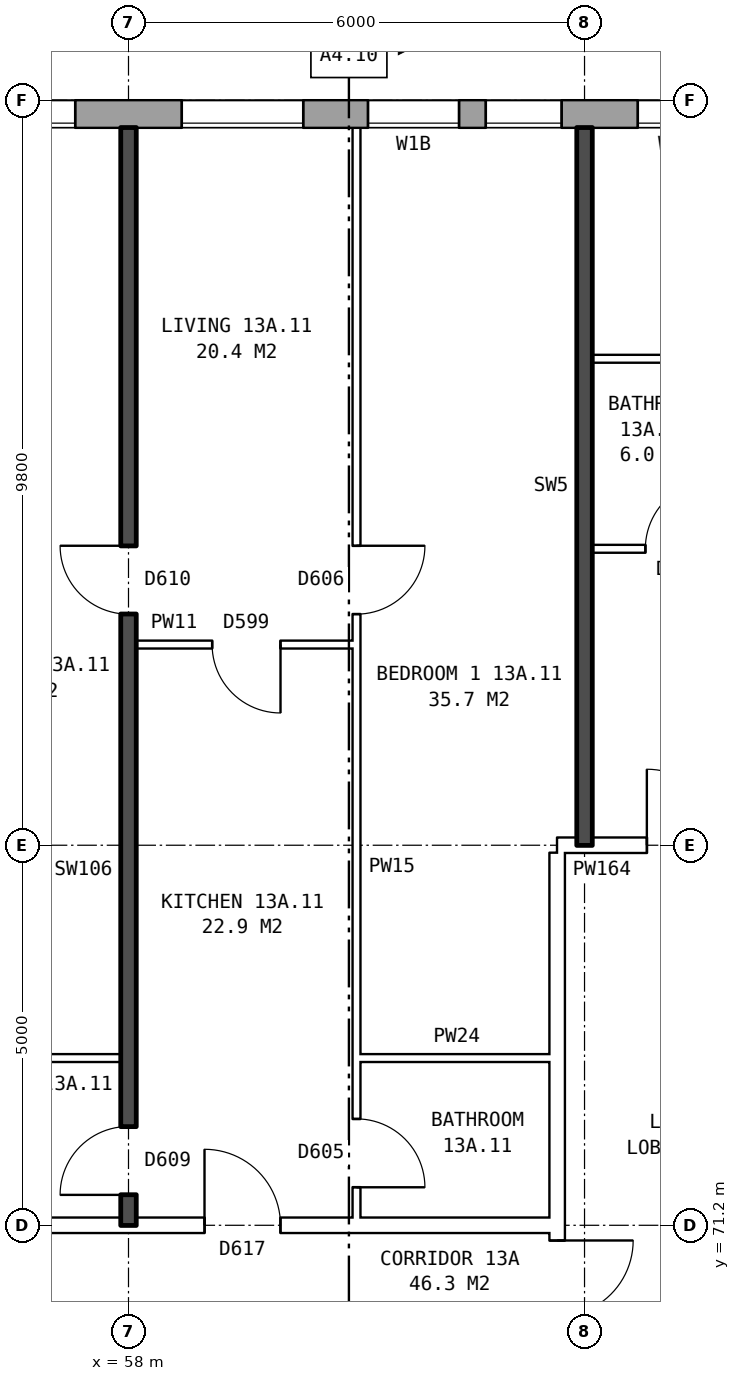
"""IFC4 building model, lengths in metres.
Left out: names, types, materials, properties, quantities, classifications, styles, units other than length and angle.
Written with IfcOpenShell. Run it as: python <this file> out.ifc"""

import sys

from ifc_helpers import new_model, si_unit, direction, frame, frame_2d, origin, place, context, subcontext, project, spatial, rectangle, extrude, element, fill, save


model = new_model("IFC4")
c1 = context("Model", 3, precision=1e-05, world=origin(), true_north=direction((0.0, 1.0)))
c2 = subcontext(c1, "Body", "Model", "MODEL_VIEW")
j1 = project(units=[si_unit("LENGTHUNIT", "METRE"), si_unit("PLANEANGLEUNIT", "RADIAN")], contexts=[c1])
p1 = place(None, origin())
s1 = spatial("IfcSite", under=j1, at=p1, CompositionType="ELEMENT")
p2 = place(p1, origin())
s2 = spatial("IfcBuilding", under=s1, at=p2, CompositionType="ELEMENT")
p3 = place(p2, frame((0.0, 0.0, 50.5)))
s3 = spatial("IfcBuildingStorey", under=s2, at=p3, CompositionType="ELEMENT", Elevation=50.5)
p4 = place(p3, frame((72.925, 85.82, 0.0), z_axis=(0.0, 0.0, 1.0), x_axis=(-1.0, 0.0, 0.0)))
e1 = element("IfcWall", 1, at=p4, inside=s3, PredefinedType="STANDARD", context=c2, shape_type="SweptSolid", body=[
    extrude(rectangle(XDim=48.351, YDim=0.36, at=frame_2d((24.175, 0.0))), origin(), (0.0, 0.0, 1.0), 2.85),
])
p5 = place(p4, frame((0.625, 0.0, 0.8)))
e2 = element("IfcOpeningElement", 2, at=p5, cuts=e1, PredefinedType="OPENING", context=c2, shape_type="SweptSolid", body=[
    extrude(rectangle(XDim=1.6, YDim=1.8, at=frame_2d((0.8, 0.9))), frame((0.0, 0.19, 0.0), z_axis=(0.0, -1.0, 0.0), x_axis=(1.0, 0.0, 0.0)), (0.0, 0.0, 1.0), 0.38),
])
p6 = place(p4, frame((3.625, 0.0, 0.8)))
e3 = element("IfcOpeningElement", 3, at=p6, cuts=e1, PredefinedType="OPENING", context=c2, shape_type="SweptSolid", body=[
    extrude(rectangle(XDim=1.6, YDim=1.8, at=frame_2d((0.8, 0.9))), frame((0.0, 0.19, 0.0), z_axis=(0.0, -1.0, 0.0), x_axis=(1.0, 0.0, 0.0)), (0.0, 0.0, 1.0), 0.38),
])
p7 = place(p4, frame((5.525, 0.0, 0.8)))
e4 = element("IfcOpeningElement", 4, at=p7, cuts=e1, PredefinedType="OPENING", context=c2, shape_type="SweptSolid", body=[
    extrude(rectangle(XDim=1.4, YDim=1.8, at=frame_2d((0.7, 0.9))), frame((0.0, 0.19, 0.0), z_axis=(0.0, -1.0, 0.0), x_axis=(1.0, 0.0, 0.0)), (0.0, 0.0, 1.0), 0.38),
])
p8 = place(p4, frame((9.225, 0.0, 0.45)))
e5 = element("IfcOpeningElement", 5, at=p8, cuts=e1, PredefinedType="OPENING", context=c2, shape_type="SweptSolid", body=[
    extrude(rectangle(XDim=1.0, YDim=0.9, at=frame_2d((0.5, 0.45))), frame((0.0, 0.19, 0.0), z_axis=(0.0, -1.0, 0.0), x_axis=(1.0, 0.0, 0.0)), (0.0, 0.0, 1.0), 0.38),
])
p9 = place(p4, frame((12.625, 0.0, 0.8)))
e6 = element("IfcOpeningElement", 6, at=p9, cuts=e1, PredefinedType="OPENING", context=c2, shape_type="SweptSolid", body=[
    extrude(rectangle(XDim=1.6, YDim=1.8, at=frame_2d((0.8, 0.9))), frame((0.0, 0.19, 0.0), z_axis=(0.0, -1.0, 0.0), x_axis=(1.0, 0.0, 0.0)), (0.0, 0.0, 1.0), 0.38),
])
p10 = place(p4, frame((15.625, 0.0, 0.8)))
e7 = element("IfcOpeningElement", 7, at=p10, cuts=e1, PredefinedType="OPENING", context=c2, shape_type="SweptSolid", body=[
    extrude(rectangle(XDim=1.6, YDim=1.8, at=frame_2d((0.8, 0.9))), frame((0.0, 0.19, 0.0), z_axis=(0.0, -1.0, 0.0), x_axis=(1.0, 0.0, 0.0)), (0.0, 0.0, 1.0), 0.38),
])
p11 = place(p4, frame((18.625, 0.0, 0.8)))
e8 = element("IfcOpeningElement", 8, at=p11, cuts=e1, PredefinedType="OPENING", context=c2, shape_type="SweptSolid", body=[
    extrude(rectangle(XDim=1.6, YDim=1.8, at=frame_2d((0.8, 0.9))), frame((0.0, 0.19, 0.0), z_axis=(0.0, -1.0, 0.0), x_axis=(1.0, 0.0, 0.0)), (0.0, 0.0, 1.0), 0.38),
])
p12 = place(p4, frame((21.625, 0.0, 0.8)))
e9 = element("IfcOpeningElement", 9, at=p12, cuts=e1, PredefinedType="OPENING", context=c2, shape_type="SweptSolid", body=[
    extrude(rectangle(XDim=1.6, YDim=1.8, at=frame_2d((0.8, 0.9))), frame((0.0, 0.19, 0.0), z_axis=(0.0, -1.0, 0.0), x_axis=(1.0, 0.0, 0.0)), (0.0, 0.0, 1.0), 0.38),
])
p13 = place(p4, frame((24.625, 0.0, 0.8)))
e10 = element("IfcOpeningElement", 10, at=p13, cuts=e1, PredefinedType="OPENING", context=c2, shape_type="SweptSolid", body=[
    extrude(rectangle(XDim=1.6, YDim=1.8, at=frame_2d((0.8, 0.9))), frame((0.0, 0.19, 0.0), z_axis=(0.0, -1.0, 0.0), x_axis=(1.0, 0.0, 0.0)), (0.0, 0.0, 1.0), 0.38),
])
p14 = place(p4, frame((27.625, 0.0, 0.8)))
e11 = element("IfcOpeningElement", 11, at=p14, cuts=e1, PredefinedType="OPENING", context=c2, shape_type="SweptSolid", body=[
    extrude(rectangle(XDim=1.6, YDim=1.8, at=frame_2d((0.8, 0.9))), frame((0.0, 0.19, 0.0), z_axis=(0.0, -1.0, 0.0), x_axis=(1.0, 0.0, 0.0)), (0.0, 0.0, 1.0), 0.38),
])
p15 = place(p4, frame((30.625, 0.0, 0.8)))
e12 = element("IfcOpeningElement", 12, at=p15, cuts=e1, PredefinedType="OPENING", context=c2, shape_type="SweptSolid", body=[
    extrude(rectangle(XDim=1.6, YDim=1.8, at=frame_2d((0.8, 0.9))), frame((0.0, 0.19, 0.0), z_axis=(0.0, -1.0, 0.0), x_axis=(1.0, 0.0, 0.0)), (0.0, 0.0, 1.0), 0.38),
])
p16 = place(p4, frame((33.625, 0.0, 0.8)))
e13 = element("IfcOpeningElement", 13, at=p16, cuts=e1, PredefinedType="OPENING", context=c2, shape_type="SweptSolid", body=[
    extrude(rectangle(XDim=1.6, YDim=1.8, at=frame_2d((0.8, 0.9))), frame((0.0, 0.19, 0.0), z_axis=(0.0, -1.0, 0.0), x_axis=(1.0, 0.0, 0.0)), (0.0, 0.0, 1.0), 0.38),
])
p17 = place(p4, frame((36.125, 0.0, 0.8)))
e14 = element("IfcOpeningElement", 14, at=p17, cuts=e1, PredefinedType="OPENING", context=c2, shape_type="SweptSolid", body=[
    extrude(rectangle(XDim=1.0, YDim=1.8, at=frame_2d((0.5, 0.9))), frame((0.0, 0.19, 0.0), z_axis=(0.0, -1.0, 0.0), x_axis=(1.0, 0.0, 0.0)), (0.0, 0.0, 1.0), 0.38),
])
p18 = place(p4, frame((39.975, 0.0, 1.7)))
e15 = element("IfcOpeningElement", 15, at=p18, cuts=e1, PredefinedType="OPENING", context=c2, shape_type="SweptSolid", body=[
    extrude(rectangle(XDim=1.0, YDim=0.9, at=frame_2d((0.5, 0.45))), frame((0.0, 0.19, 0.0), z_axis=(0.0, -1.0, 0.0), x_axis=(1.0, 0.0, 0.0)), (0.0, 0.0, 1.0), 0.38),
])
p19 = place(p4, frame((42.625, 0.0, 0.8)))
e16 = element("IfcOpeningElement", 16, at=p19, cuts=e1, PredefinedType="OPENING", context=c2, shape_type="SweptSolid", body=[
    extrude(rectangle(XDim=1.6, YDim=1.8, at=frame_2d((0.8, 0.9))), frame((0.0, 0.19, 0.0), z_axis=(0.0, -1.0, 0.0), x_axis=(1.0, 0.0, 0.0)), (0.0, 0.0, 1.0), 0.38),
])
p20 = place(p4, frame((45.625, 0.0, 0.8)))
e17 = element("IfcOpeningElement", 17, at=p20, cuts=e1, PredefinedType="OPENING", context=c2, shape_type="SweptSolid", body=[
    extrude(rectangle(XDim=1.6, YDim=1.8, at=frame_2d((0.8, 0.9))), frame((0.0, 0.19, 0.0), z_axis=(0.0, -1.0, 0.0), x_axis=(1.0, 0.0, 0.0)), (0.0, 0.0, 1.0), 0.38),
])
p21 = place(p4, frame((7.225, 0.0, 1.6)))
e18 = element("IfcOpeningElement", 18, at=p21, cuts=e1, PredefinedType="OPENING", context=c2, shape_type="SweptSolid", body=[
    extrude(rectangle(XDim=1.0, YDim=0.9, at=frame_2d((0.5, 0.45))), frame((0.0, 0.19, 0.0), z_axis=(0.0, -1.0, 0.0), x_axis=(1.0, 0.0, 0.0)), (0.0, 0.0, 1.0), 0.38),
])
p22 = place(p4, frame((10.575, 0.0, 0.45)))
e19 = element("IfcOpeningElement", 19, at=p22, cuts=e1, PredefinedType="OPENING", context=c2, shape_type="SweptSolid", body=[
    extrude(rectangle(XDim=1.2, YDim=1.8, at=frame_2d((0.6, 0.9))), frame((0.0, 0.19, 0.0), z_axis=(0.0, -1.0, 0.0), x_axis=(1.0, 0.0, 0.0)), (0.0, 0.0, 1.0), 0.38),
])
p23 = place(p4, frame((37.425, 0.0, 0.8)))
e20 = element("IfcOpeningElement", 20, at=p23, cuts=e1, PredefinedType="OPENING", context=c2, shape_type="SweptSolid", body=[
    extrude(rectangle(XDim=1.0, YDim=0.9, at=frame_2d((0.5, 0.45))), frame((0.0, 0.19, 0.0), z_axis=(0.0, -1.0, 0.0), x_axis=(1.0, 0.0, 0.0)), (0.0, 0.0, 1.0), 0.38),
])
p24 = place(p4, frame((41.275, 0.0, 0.8)))
e21 = element("IfcOpeningElement", 21, at=p24, cuts=e1, PredefinedType="OPENING", context=c2, shape_type="SweptSolid", body=[
    extrude(rectangle(XDim=1.0, YDim=1.8, at=frame_2d((0.5, 0.9))), frame((0.0, 0.19, 0.0), z_axis=(0.0, -1.0, 0.0), x_axis=(1.0, 0.0, 0.0)), (0.0, 0.0, 1.0), 0.38),
])
p25 = place(p3, frame((63.64, 63.9, 0.0), z_axis=(0.0, 0.0, 1.0), x_axis=(0.0, 1.0, 0.0)))
e22 = element("IfcWall", 22, at=p25, inside=s3, PredefinedType="PARTITIONING", context=c2, shape_type="SweptSolid", body=[
    extrude(rectangle(XDim=12.2, YDim=0.2, at=frame_2d((6.1, 0.0))), origin(), (0.0, 0.0, 1.0), 2.85),
])
p26 = place(p25, frame((5.1, 0.0, 0.0)))
e23 = element("IfcOpeningElement", 23, at=p26, cuts=e22, PredefinedType="OPENING", context=c2, shape_type="SweptSolid", body=[
    extrude(rectangle(XDim=2.0, YDim=2.1, at=frame_2d((1.0, 1.05))), frame((0.0, 0.11, 0.0), z_axis=(0.0, -1.0, 0.0), x_axis=(1.0, 0.0, 0.0)), (0.0, 0.0, 1.0), 0.22),
])
p27 = place(p3, frame((44.36, 71.2, 0.0), z_axis=(0.0, 0.0, 1.0), x_axis=(1.0, 0.0, 0.0)))
e24 = element("IfcWall", 24, at=p27, inside=s3, PredefinedType="PARTITIONING", context=c2, shape_type="SweptSolid", body=[
    extrude(rectangle(XDim=19.28, YDim=0.2, at=frame_2d((9.64, 0.0))), origin(), (0.0, 0.0, 1.0), 2.85),
])
p28 = place(p27, frame((14.64, 0.0, 0.0)))
e25 = element("IfcOpeningElement", 25, at=p28, cuts=e24, PredefinedType="OPENING", context=c2, shape_type="SweptSolid", body=[
    extrude(rectangle(XDim=1.0, YDim=2.1, at=frame_2d((0.5, 1.05))), frame((0.0, 0.11, 0.0), z_axis=(0.0, -1.0, 0.0), x_axis=(1.0, 0.0, 0.0)), (0.0, 0.0, 1.0), 0.22),
])
p29 = place(p27, frame((5.64, 0.0, 0.0)))
e26 = element("IfcOpeningElement", 26, at=p29, cuts=e24, PredefinedType="OPENING", context=c2, shape_type="SweptSolid", body=[
    extrude(rectangle(XDim=1.0, YDim=2.1, at=frame_2d((0.5, 1.05))), frame((0.0, 0.11, 0.0), z_axis=(0.0, -1.0, 0.0), x_axis=(1.0, 0.0, 0.0)), (0.0, 0.0, 1.0), 0.22),
])
p30 = place(p3, frame((52.1, 73.4, 0.0), z_axis=(0.0, 0.0, 1.0), x_axis=(1.0, 0.0, 0.0)))
e27 = element("IfcWall", 27, at=p30, inside=s3, PredefinedType="PARTITIONING", context=c2, shape_type="SweptSolid", body=[
    extrude(rectangle(XDim=5.8, YDim=0.1, at=frame_2d((2.9, 0.0))), origin(), (0.0, 0.0, 1.0), 2.85),
])
p31 = place(p3, frame((61.0, 73.4, 0.0), z_axis=(0.0, 0.0, 1.0), x_axis=(1.0, 0.0, 0.0)))
e28 = element("IfcWall", 28, at=p31, inside=s3, PredefinedType="PARTITIONING", context=c2, shape_type="SweptSolid", body=[
    extrude(rectangle(XDim=2.64, YDim=0.1, at=frame_2d((1.32, 0.0))), origin(), (0.0, 0.0, 1.0), 2.85),
])
p32 = place(p3, frame((63.64, 76.2, 0.0), z_axis=(0.0, 0.0, 1.0), x_axis=(1.0, 0.0, 0.0)))
e29 = element("IfcWall", 29, at=p32, inside=s3, PredefinedType="PARTITIONING", context=c2, shape_type="SweptSolid", body=[
    extrude(rectangle(XDim=3.0, YDim=0.2, at=frame_2d((1.5, 0.0))), origin(), (0.0, 0.0, 1.0), 2.85),
])
p33 = place(p32, frame((1.18, 0.0, 0.0)))
e30 = element("IfcOpeningElement", 30, at=p33, cuts=e29, PredefinedType="OPENING", context=c2, shape_type="SweptSolid", body=[
    extrude(rectangle(XDim=1.0, YDim=2.1, at=frame_2d((0.5, 1.05))), frame((0.0, 0.11, 0.0), z_axis=(0.0, -1.0, 0.0), x_axis=(1.0, 0.0, 0.0)), (0.0, 0.0, 1.0), 0.22),
])
p34 = place(p3, frame((58.1, 78.84, 0.0), z_axis=(0.0, 0.0, 1.0), x_axis=(1.0, 0.0, 0.0)))
e31 = element("IfcWall", 31, at=p34, inside=s3, PredefinedType="PARTITIONING", context=c2, shape_type="SweptSolid", body=[
    extrude(rectangle(XDim=2.9, YDim=0.1, at=frame_2d((1.45, 0.0))), origin(), (0.0, 0.0, 1.0), 2.85),
])
p35 = place(p34, frame((1.0, 0.0, 0.0)))
e32 = element("IfcOpeningElement", 32, at=p35, cuts=e31, PredefinedType="OPENING", context=c2, shape_type="SweptSolid", body=[
    extrude(rectangle(XDim=0.9, YDim=2.1, at=frame_2d((0.45, 1.05))), frame((0.0, 0.06, 0.0), z_axis=(0.0, -1.0, 0.0), x_axis=(1.0, 0.0, 0.0)), (0.0, 0.0, 1.0), 0.12),
])
p36 = place(p3, frame((64.1, 80.1, 0.0), z_axis=(0.0, 0.0, 1.0), x_axis=(1.0, 0.0, 0.0)))
e33 = element("IfcWall", 33, at=p36, inside=s3, PredefinedType="PARTITIONING", context=c2, shape_type="SweptSolid", body=[
    extrude(rectangle(XDim=5.8, YDim=0.1, at=frame_2d((2.9, 0.0))), origin(), (0.0, 0.0, 1.0), 2.85),
])
p37 = place(p36, frame((3.6, 0.0, 0.0)))
e34 = element("IfcOpeningElement", 34, at=p37, cuts=e33, PredefinedType="OPENING", context=c2, shape_type="SweptSolid", body=[
    extrude(rectangle(XDim=0.9, YDim=2.1, at=frame_2d((0.45, 1.05))), frame((0.0, 0.06, 0.0), z_axis=(0.0, -1.0, 0.0), x_axis=(1.0, 0.0, 0.0)), (0.0, 0.0, 1.0), 0.12),
])
p38 = place(p36, frame((0.7, 0.0, 0.0)))
e35 = element("IfcOpeningElement", 35, at=p38, cuts=e33, PredefinedType="OPENING", context=c2, shape_type="SweptSolid", body=[
    extrude(rectangle(XDim=0.9, YDim=2.1, at=frame_2d((0.45, 1.05))), frame((0.0, 0.06, 0.0), z_axis=(0.0, -1.0, 0.0), x_axis=(1.0, 0.0, 0.0)), (0.0, 0.0, 1.0), 0.12),
])
p39 = place(p3, frame((64.1, 82.6, 0.0), z_axis=(0.0, 0.0, 1.0), x_axis=(1.0, 0.0, 0.0)))
e36 = element("IfcWall", 36, at=p39, inside=s3, PredefinedType="PARTITIONING", context=c2, shape_type="SweptSolid", body=[
    extrude(rectangle(XDim=2.3, YDim=0.1, at=frame_2d((1.15, 0.0))), origin(), (0.0, 0.0, 1.0), 2.85),
])
p40 = place(p3, frame((58.0, 71.2, 0.0), z_axis=(0.0, 0.0, 1.0), x_axis=(0.0, 1.0, 0.0)))
e37 = element("IfcWall", 37, at=p40, inside=s3, PredefinedType="SOLIDWALL", context=c2, shape_type="SweptSolid", body=[
    extrude(rectangle(XDim=14.44, YDim=0.2, at=frame_2d((7.22, 0.0))), origin(), (0.0, 0.0, 1.0), 2.85),
])
p41 = place(p40, frame((8.04, 0.0, 0.0)))
e38 = element("IfcOpeningElement", 38, at=p41, cuts=e37, PredefinedType="OPENING", context=c2, shape_type="SweptSolid", body=[
    extrude(rectangle(XDim=0.9, YDim=2.1, at=frame_2d((0.45, 1.05))), frame((0.0, 0.11, 0.0), z_axis=(0.0, -1.0, 0.0), x_axis=(1.0, 0.0, 0.0)), (0.0, 0.0, 1.0), 0.22),
])
p42 = place(p40, frame((0.4, 0.0, 0.0)))
e39 = element("IfcOpeningElement", 39, at=p42, cuts=e37, PredefinedType="OPENING", context=c2, shape_type="SweptSolid", body=[
    extrude(rectangle(XDim=0.9, YDim=2.1, at=frame_2d((0.45, 1.05))), frame((0.0, 0.11, 0.0), z_axis=(0.0, -1.0, 0.0), x_axis=(1.0, 0.0, 0.0)), (0.0, 0.0, 1.0), 0.22),
])
p43 = place(p3, frame((61.0, 71.3, 0.0), z_axis=(0.0, 0.0, 1.0), x_axis=(0.0, 1.0, 0.0)))
e40 = element("IfcWall", 40, at=p43, inside=s3, PredefinedType="PARTITIONING", context=c2, shape_type="SweptSolid", body=[
    extrude(rectangle(XDim=14.34, YDim=0.1, at=frame_2d((7.17, 0.0))), origin(), (0.0, 0.0, 1.0), 2.85),
])
p44 = place(p43, frame((7.94, 0.0, 0.0)))
e41 = element("IfcOpeningElement", 41, at=p44, cuts=e40, PredefinedType="OPENING", context=c2, shape_type="SweptSolid", body=[
    extrude(rectangle(XDim=0.9, YDim=2.1, at=frame_2d((0.45, 1.05))), frame((0.0, 0.06, 0.0), z_axis=(0.0, -1.0, 0.0), x_axis=(1.0, 0.0, 0.0)), (0.0, 0.0, 1.0), 0.12),
])
p45 = place(p43, frame((0.4, 0.0, 0.0)))
e42 = element("IfcOpeningElement", 42, at=p45, cuts=e40, PredefinedType="OPENING", context=c2, shape_type="SweptSolid", body=[
    extrude(rectangle(XDim=0.9, YDim=2.1, at=frame_2d((0.45, 1.05))), frame((0.0, 0.06, 0.0), z_axis=(0.0, -1.0, 0.0), x_axis=(1.0, 0.0, 0.0)), (0.0, 0.0, 1.0), 0.12),
])
p46 = place(p3, frame((64.0, 76.2, 0.0), z_axis=(0.0, 0.0, 1.0), x_axis=(0.0, 1.0, 0.0)))
e43 = element("IfcWall", 43, at=p46, inside=s3, PredefinedType="SOLIDWALL", context=c2, shape_type="SweptSolid", body=[
    extrude(rectangle(XDim=9.44, YDim=0.2, at=frame_2d((4.72, 0.0))), origin(), (0.0, 0.0, 1.0), 2.85),
])
p47 = place(p8, origin())
e44 = element("IfcWindow", 44, at=p47, inside=s3, PartitioningType="SINGLE_PANEL", PredefinedType="WINDOW", context=c2, shape_type="SweptSolid", body=[
    extrude(rectangle(XDim=1.0, YDim=0.9, at=frame_2d((0.5, 0.45))), frame((0.0, 0.15, 0.0), z_axis=(0.0, -1.0, 0.0), x_axis=(1.0, 0.0, 0.0)), (0.0, 0.0, 1.0), 0.06),
])
fill(e5, e44)
p48 = place(p9, origin())
e45 = element("IfcWindow", 45, at=p48, inside=s3, PartitioningType="SINGLE_PANEL", PredefinedType="WINDOW", context=c2, shape_type="SweptSolid", body=[
    extrude(rectangle(XDim=1.6, YDim=1.8, at=frame_2d((0.8, 0.9))), frame((0.0, 0.15, 0.0), z_axis=(0.0, -1.0, 0.0), x_axis=(1.0, 0.0, 0.0)), (0.0, 0.0, 1.0), 0.06),
])
fill(e6, e45)
p49 = place(p10, origin())
e46 = element("IfcWindow", 46, at=p49, inside=s3, PartitioningType="SINGLE_PANEL", PredefinedType="WINDOW", context=c2, shape_type="SweptSolid", body=[
    extrude(rectangle(XDim=1.6, YDim=1.8, at=frame_2d((0.8, 0.9))), frame((0.0, 0.15, 0.0), z_axis=(0.0, -1.0, 0.0), x_axis=(1.0, 0.0, 0.0)), (0.0, 0.0, 1.0), 0.06),
])
fill(e7, e46)
p50 = place(p26, frame((2.0, 0.0, 0.0), z_axis=(0.0, 0.0, 1.0), x_axis=(-1.0, 0.0, 0.0)))
e47 = element("IfcDoor", 47, at=p50, inside=s3, OperationType="DOUBLE_DOOR_SINGLE_SWING", PredefinedType="DOOR", context=c2, shape_type="SweptSolid", body=[
    extrude(rectangle(XDim=2.0, YDim=2.1, at=frame_2d((1.0, 1.05))), frame((0.0, 0.025, 0.0), z_axis=(0.0, -1.0, 0.0), x_axis=(1.0, 0.0, 0.0)), (0.0, 0.0, 1.0), 0.05),
])
fill(e23, e47)
p51 = place(p33, origin())
e48 = element("IfcDoor", 48, at=p51, inside=s3, OperationType="SINGLE_SWING_LEFT", PredefinedType="DOOR", context=c2, shape_type="SweptSolid", body=[
    extrude(rectangle(XDim=1.0, YDim=2.1, at=frame_2d((0.5, 1.05))), frame((0.0, 0.025, 0.0), z_axis=(0.0, -1.0, 0.0), x_axis=(1.0, 0.0, 0.0)), (0.0, 0.0, 1.0), 0.05),
])
fill(e30, e48)
p52 = place(p38, origin())
e49 = element("IfcDoor", 49, at=p52, inside=s3, OperationType="SINGLE_SWING_RIGHT", PredefinedType="DOOR", context=c2, shape_type="SweptSolid", body=[
    extrude(rectangle(XDim=0.9, YDim=2.1, at=frame_2d((0.45, 1.05))), frame((0.0, 0.025, 0.0), z_axis=(0.0, -1.0, 0.0), x_axis=(1.0, 0.0, 0.0)), (0.0, 0.0, 1.0), 0.05),
])
fill(e35, e49)
p53 = place(p44, frame((0.9, 0.0, 0.0), z_axis=(0.0, 0.0, 1.0), x_axis=(-1.0, 0.0, 0.0)))
e50 = element("IfcDoor", 50, at=p53, inside=s3, OperationType="SINGLE_SWING_LEFT", PredefinedType="DOOR", context=c2, shape_type="SweptSolid", body=[
    extrude(rectangle(XDim=0.9, YDim=2.1, at=frame_2d((0.45, 1.05))), frame((0.0, 0.025, 0.0), z_axis=(0.0, -1.0, 0.0), x_axis=(1.0, 0.0, 0.0)), (0.0, 0.0, 1.0), 0.05),
])
fill(e41, e50)
p54 = place(p41, origin())
e51 = element("IfcDoor", 51, at=p54, inside=s3, OperationType="SINGLE_SWING_RIGHT", PredefinedType="DOOR", context=c2, shape_type="SweptSolid", body=[
    extrude(rectangle(XDim=0.9, YDim=2.1, at=frame_2d((0.45, 1.05))), frame((0.0, 0.025, 0.0), z_axis=(0.0, -1.0, 0.0), x_axis=(1.0, 0.0, 0.0)), (0.0, 0.0, 1.0), 0.05),
])
fill(e38, e51)
p55 = place(p28, origin())
e52 = element("IfcDoor", 52, at=p55, inside=s3, OperationType="SINGLE_SWING_LEFT", PredefinedType="DOOR", context=c2, shape_type="SweptSolid", body=[
    extrude(rectangle(XDim=1.0, YDim=2.1, at=frame_2d((0.5, 1.05))), frame((0.0, 0.025, 0.0), z_axis=(0.0, -1.0, 0.0), x_axis=(1.0, 0.0, 0.0)), (0.0, 0.0, 1.0), 0.05),
])
fill(e25, e52)
p56 = place(p35, frame((0.9, 0.0, 0.0), z_axis=(0.0, 0.0, 1.0), x_axis=(-1.0, 0.0, 0.0)))
e53 = element("IfcDoor", 53, at=p56, inside=s3, OperationType="SINGLE_SWING_LEFT", PredefinedType="DOOR", context=c2, shape_type="SweptSolid", body=[
    extrude(rectangle(XDim=0.9, YDim=2.1, at=frame_2d((0.45, 1.05))), frame((0.0, 0.025, 0.0), z_axis=(0.0, -1.0, 0.0), x_axis=(1.0, 0.0, 0.0)), (0.0, 0.0, 1.0), 0.05),
])
fill(e32, e53)
p57 = place(p45, frame((0.9, 0.0, 0.0), z_axis=(0.0, 0.0, 1.0), x_axis=(-1.0, 0.0, 0.0)))
e54 = element("IfcDoor", 54, at=p57, inside=s3, OperationType="SINGLE_SWING_RIGHT", PredefinedType="DOOR", context=c2, shape_type="SweptSolid", body=[
    extrude(rectangle(XDim=0.9, YDim=2.1, at=frame_2d((0.45, 1.05))), frame((0.0, 0.025, 0.0), z_axis=(0.0, -1.0, 0.0), x_axis=(1.0, 0.0, 0.0)), (0.0, 0.0, 1.0), 0.05),
])
fill(e42, e54)
p58 = place(p42, origin())
e55 = element("IfcDoor", 55, at=p58, inside=s3, OperationType="SINGLE_SWING_LEFT", PredefinedType="DOOR", context=c2, shape_type="SweptSolid", body=[
    extrude(rectangle(XDim=0.9, YDim=2.1, at=frame_2d((0.45, 1.05))), frame((0.0, 0.025, 0.0), z_axis=(0.0, -1.0, 0.0), x_axis=(1.0, 0.0, 0.0)), (0.0, 0.0, 1.0), 0.05),
])
fill(e39, e55)
p59 = place(p21, origin())
e56 = element("IfcWindow", 56, at=p59, inside=s3, PartitioningType="SINGLE_PANEL", PredefinedType="WINDOW", context=c2, shape_type="SweptSolid", body=[
    extrude(rectangle(XDim=1.0, YDim=0.9, at=frame_2d((0.5, 0.45))), frame((0.0, 0.15, 0.0), z_axis=(0.0, -1.0, 0.0), x_axis=(1.0, 0.0, 0.0)), (0.0, 0.0, 1.0), 0.06),
])
fill(e18, e56)
p60 = place(p22, origin())
e57 = element("IfcWindow", 57, at=p60, inside=s3, PartitioningType="SINGLE_PANEL", PredefinedType="WINDOW", context=c2, shape_type="SweptSolid", body=[
    extrude(rectangle(XDim=1.2, YDim=1.8, at=frame_2d((0.6, 0.9))), frame((0.0, 0.15, 0.0), z_axis=(0.0, -1.0, 0.0), x_axis=(1.0, 0.0, 0.0)), (0.0, 0.0, 1.0), 0.06),
])
fill(e19, e57)
save(model, sys.argv[1])
